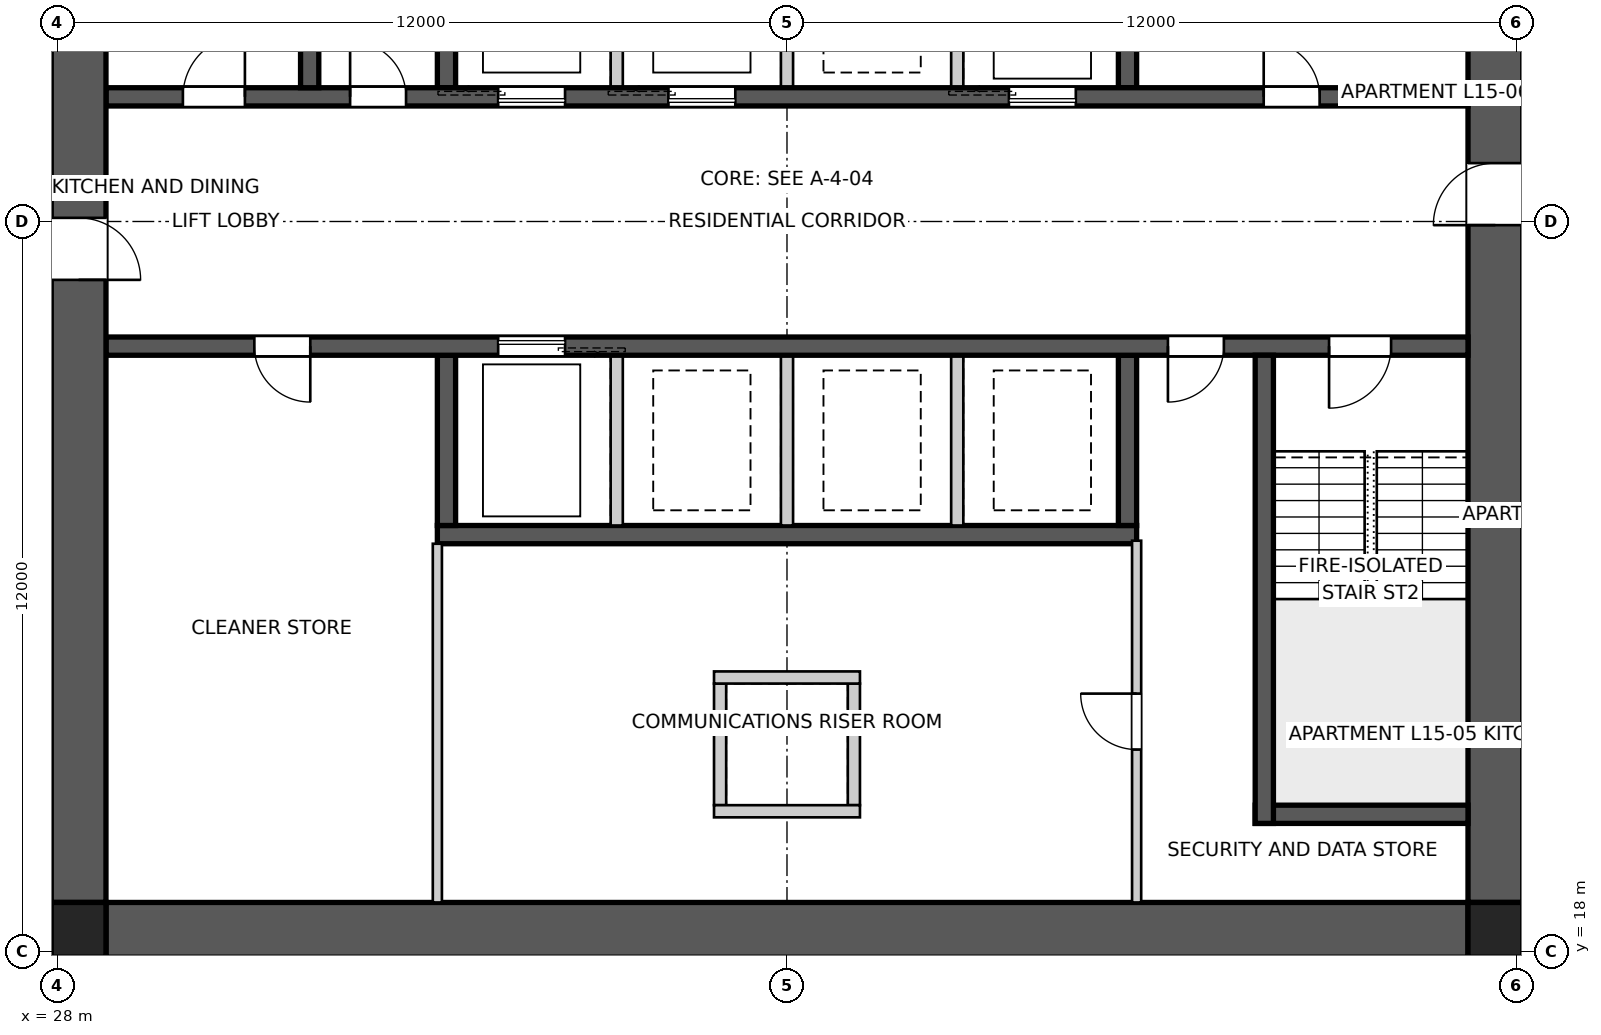
"""IFC4 building model, lengths in metres.
Left out: names, types, materials, properties, quantities, classifications, styles, units other than length and angle.
Written with IfcOpenShell. Run it as: python <this file> out.ifc"""

import sys

from ifc_helpers import new_model, si_unit, direction, frame, frame_2d, origin, origin_2d, place, context, subcontext, project, spatial, polyline, rectangle, outline, extrude, element, fill, save


model = new_model("IFC4")
c1 = context("Model", 3, precision=1e-05, world=origin(), true_north=direction((0.0, 1.0)))
c2 = subcontext(c1, "Body", "Model", "MODEL_VIEW")
j1 = project(units=[si_unit("LENGTHUNIT", "METRE"), si_unit("PLANEANGLEUNIT", "RADIAN")], contexts=[c1])
p1 = place(None, origin())
s1 = spatial("IfcSite", under=j1, at=p1, CompositionType="ELEMENT")
p2 = place(p1, origin())
s2 = spatial("IfcBuilding", under=s1, at=p2, CompositionType="ELEMENT")
p3 = place(p2, frame((0.0, 0.0, 57.4)))
s3 = spatial("IfcBuildingStorey", under=s2, at=p3, CompositionType="ELEMENT", Elevation=57.4)
p4 = place(p3, frame((51.2, 18.35, 0.0), z_axis=(0.0, 0.0, 1.0), x_axis=(-1.0, 0.0, 0.0)))
e1 = element("IfcWall", 1, at=p4, inside=s3, PredefinedType="SHEAR", context=c2, shape_type="SweptSolid", body=[
    extrude(outline(polyline([(0.0, -0.45), (22.4, -0.45), (22.4, -0.025), (22.85, -0.025), (22.85, 0.025), (22.4, 0.025), (22.4, 0.45), (0.0, 0.45), (0.0, 0.025), (-0.45, 0.025), (-0.45, -0.025), (0.0, -0.025), (0.0, -0.45)])), origin(), (0.0, 0.0, 1.0), 3.4),
])
p5 = place(p3, frame((51.65, 18.8, 0.0), z_axis=(0.0, 0.0, 1.0), x_axis=(0.0, 1.0, 0.0)))
e2 = element("IfcWall", 2, at=p5, inside=s3, PredefinedType="SHEAR", context=c2, shape_type="SweptSolid", body=[
    extrude(outline(polyline([(0.0, -0.45), (22.4, -0.45), (22.4, -0.025), (22.85, -0.025), (22.85, 0.025), (22.4, 0.025), (22.4, 0.45), (0.0, 0.45), (0.0, 0.025), (-0.45, 0.025), (-0.45, -0.025), (0.0, -0.025), (0.0, -0.45)])), origin(), (0.0, 0.0, 1.0), 3.4),
])
p6 = place(p5, frame((11.14, 0.0, 0.0)))
e3 = element("IfcOpeningElement", 3, at=p6, cuts=e2, PredefinedType="OPENING", context=c2, shape_type="SweptSolid", body=[
    extrude(rectangle(XDim=1.02, YDim=2.4, at=frame_2d((0.51, 1.2))), frame((0.0, 0.46, 0.0), z_axis=(0.0, -1.0, 0.0), x_axis=(1.0, 0.0, 0.0)), (0.0, 0.0, 1.0), 0.92),
])
p7 = place(p3, frame((28.35, 41.2, 0.0), z_axis=(0.0, 0.0, 1.0), x_axis=(0.0, -1.0, 0.0)))
e4 = element("IfcWall", 4, at=p7, inside=s3, PredefinedType="SHEAR", context=c2, shape_type="SweptSolid", body=[
    extrude(outline(polyline([(0.0, -0.45), (22.4, -0.45), (22.4, -0.025), (22.85, -0.025), (22.85, 0.025), (22.4, 0.025), (22.4, 0.45), (0.0, 0.45), (0.0, 0.025), (-0.45, 0.025), (-0.45, -0.025), (0.0, -0.025), (0.0, -0.45)])), origin(), (0.0, 0.0, 1.0), 3.4),
])
p8 = place(p7, frame((11.14, 0.0, 0.0)))
e5 = element("IfcOpeningElement", 5, at=p8, cuts=e4, PredefinedType="OPENING", context=c2, shape_type="SweptSolid", body=[
    extrude(rectangle(XDim=1.02, YDim=2.4, at=frame_2d((0.51, 1.2))), frame((0.0, 0.46, 0.0), z_axis=(0.0, -1.0, 0.0), x_axis=(1.0, 0.0, 0.0)), (0.0, 0.0, 1.0), 0.92),
])
p9 = place(p3, frame((28.8, 32.05, 0.0), z_axis=(0.0, 0.0, 1.0), x_axis=(1.0, 0.0, 0.0)))
e6 = element("IfcWall", 6, at=p9, inside=s3, PredefinedType="SHEAR", context=c2, shape_type="SweptSolid", body=[
    extrude(rectangle(XDim=22.4, YDim=0.3, at=frame_2d((11.2, 0.0))), origin(), (0.0, 0.0, 1.0), 3.4),
])
p10 = place(p9, frame((19.04, 0.0, 0.0)))
e7 = element("IfcOpeningElement", 7, at=p10, cuts=e6, PredefinedType="OPENING", context=c2, shape_type="SweptSolid", body=[
    extrude(rectangle(XDim=0.92, YDim=2.1, at=frame_2d((0.46, 1.05))), frame((0.0, 0.16, 0.0), z_axis=(0.0, -1.0, 0.0), x_axis=(1.0, 0.0, 0.0)), (0.0, 0.0, 1.0), 0.32),
])
p11 = place(p9, frame((1.265, 0.0, 0.0)))
e8 = element("IfcOpeningElement", 8, at=p11, cuts=e6, PredefinedType="OPENING", context=c2, shape_type="SweptSolid", body=[
    extrude(rectangle(XDim=1.02, YDim=2.1, at=frame_2d((0.51, 1.05))), frame((0.0, 0.16, 0.0), z_axis=(0.0, -1.0, 0.0), x_axis=(1.0, 0.0, 0.0)), (0.0, 0.0, 1.0), 0.32),
])
p12 = place(p9, frame((4.015, 0.0, 0.0)))
e9 = element("IfcOpeningElement", 9, at=p12, cuts=e6, PredefinedType="OPENING", context=c2, shape_type="SweptSolid", body=[
    extrude(rectangle(XDim=0.92, YDim=2.1, at=frame_2d((0.46, 1.05))), frame((0.0, 0.16, 0.0), z_axis=(0.0, -1.0, 0.0), x_axis=(1.0, 0.0, 0.0)), (0.0, 0.0, 1.0), 0.32),
])
p13 = place(p9, frame((6.45, 0.0, 0.0)))
e10 = element("IfcOpeningElement", 10, at=p13, cuts=e6, PredefinedType="OPENING", context=c2, shape_type="SweptSolid", body=[
    extrude(rectangle(XDim=1.1, YDim=2.1, at=frame_2d((0.55, 1.05))), frame((0.0, 0.16, 0.0), z_axis=(0.0, -1.0, 0.0), x_axis=(1.0, 0.0, 0.0)), (0.0, 0.0, 1.0), 0.32),
])
p14 = place(p9, frame((9.25, 0.0, 0.0)))
e11 = element("IfcOpeningElement", 11, at=p14, cuts=e6, PredefinedType="OPENING", context=c2, shape_type="SweptSolid", body=[
    extrude(rectangle(XDim=1.1, YDim=2.1, at=frame_2d((0.55, 1.05))), frame((0.0, 0.16, 0.0), z_axis=(0.0, -1.0, 0.0), x_axis=(1.0, 0.0, 0.0)), (0.0, 0.0, 1.0), 0.32),
])
p15 = place(p9, frame((14.85, 0.0, 0.0)))
e12 = element("IfcOpeningElement", 12, at=p15, cuts=e6, PredefinedType="OPENING", context=c2, shape_type="SweptSolid", body=[
    extrude(rectangle(XDim=1.1, YDim=2.1, at=frame_2d((0.55, 1.05))), frame((0.0, 0.16, 0.0), z_axis=(0.0, -1.0, 0.0), x_axis=(1.0, 0.0, 0.0)), (0.0, 0.0, 1.0), 0.32),
])
p16 = place(p3, frame((51.2, 27.95, 0.0), z_axis=(0.0, 0.0, 1.0), x_axis=(-1.0, 0.0, 0.0)))
e13 = element("IfcWall", 13, at=p16, inside=s3, PredefinedType="SHEAR", context=c2, shape_type="SweptSolid", body=[
    extrude(rectangle(XDim=22.4, YDim=0.3, at=frame_2d((11.2, 0.0))), origin(), (0.0, 0.0, 1.0), 3.4),
])
p17 = place(p16, frame((19.04, 0.0, 0.0)))
e14 = element("IfcOpeningElement", 14, at=p17, cuts=e13, PredefinedType="OPENING", context=c2, shape_type="SweptSolid", body=[
    extrude(rectangle(XDim=0.92, YDim=2.1, at=frame_2d((0.46, 1.05))), frame((0.0, 0.16, 0.0), z_axis=(0.0, -1.0, 0.0), x_axis=(1.0, 0.0, 0.0)), (0.0, 0.0, 1.0), 0.32),
])
p18 = place(p16, frame((1.265, 0.0, 0.0)))
e15 = element("IfcOpeningElement", 15, at=p18, cuts=e13, PredefinedType="OPENING", context=c2, shape_type="SweptSolid", body=[
    extrude(rectangle(XDim=1.02, YDim=2.1, at=frame_2d((0.51, 1.05))), frame((0.0, 0.16, 0.0), z_axis=(0.0, -1.0, 0.0), x_axis=(1.0, 0.0, 0.0)), (0.0, 0.0, 1.0), 0.32),
])
p19 = place(p16, frame((4.015, 0.0, 0.0)))
e16 = element("IfcOpeningElement", 16, at=p19, cuts=e13, PredefinedType="OPENING", context=c2, shape_type="SweptSolid", body=[
    extrude(rectangle(XDim=0.92, YDim=2.1, at=frame_2d((0.46, 1.05))), frame((0.0, 0.16, 0.0), z_axis=(0.0, -1.0, 0.0), x_axis=(1.0, 0.0, 0.0)), (0.0, 0.0, 1.0), 0.32),
])
p20 = place(p16, frame((14.85, 0.0, 0.0)))
e17 = element("IfcOpeningElement", 17, at=p20, cuts=e13, PredefinedType="OPENING", context=c2, shape_type="SweptSolid", body=[
    extrude(rectangle(XDim=1.1, YDim=2.1, at=frame_2d((0.55, 1.05))), frame((0.0, 0.16, 0.0), z_axis=(0.0, -1.0, 0.0), x_axis=(1.0, 0.0, 0.0)), (0.0, 0.0, 1.0), 0.32),
])
p21 = place(p3, frame((45.75, 24.85, 0.0), z_axis=(0.0, 0.0, 1.0), x_axis=(-1.0, 0.0, 0.0)))
e18 = element("IfcWall", 18, at=p21, inside=s3, PredefinedType="SHEAR", context=c2, shape_type="SweptSolid", body=[
    extrude(rectangle(XDim=11.5, YDim=0.3, at=frame_2d((5.75, 0.0))), origin(), (0.0, 0.0, 1.0), 3.4),
])
for number, where, z_axis, x_axis in (
    (19, (34.4, 32.2, 0.0), (0.0, 0.0, 1.0), (0.0, 1.0, 0.0)),
    (20, (45.6, 27.8, 0.0), (0.0, 0.0, 1.0), (0.0, -1.0, 0.0)),
):
    element("IfcWall", number, at=place(p3, frame(where, z_axis=z_axis, x_axis=x_axis)), inside=s3, PredefinedType="SHEAR", context=c2, shape_type="SweptSolid", body=[
        extrude(rectangle(XDim=2.8, YDim=0.3, at=frame_2d((1.4, 0.0))), origin(), (0.0, 0.0, 1.0), 3.4),
    ])
for number, where, z_axis, x_axis in (
    (21, (37.2, 32.2, 0.0), (0.0, 0.0, 1.0), (0.0, 1.0, 0.0)),
    (22, (42.8, 27.8, 0.0), (0.0, 0.0, 1.0), (0.0, -1.0, 0.0)),
    (23, (40.0, 32.2, 0.0), (0.0, 0.0, 1.0), (0.0, 1.0, 0.0)),
    (24, (40.0, 27.8, 0.0), (0.0, 0.0, 1.0), (0.0, -1.0, 0.0)),
    (25, (42.8, 32.2, 0.0), (0.0, 0.0, 1.0), (0.0, 1.0, 0.0)),
    (26, (37.2, 27.8, 0.0), (0.0, 0.0, 1.0), (0.0, -1.0, 0.0)),
):
    element("IfcWall", number, at=place(p3, frame(where, z_axis=z_axis, x_axis=x_axis)), inside=s3, PredefinedType="SOLIDWALL", context=c2, shape_type="SweptSolid", body=[
        extrude(rectangle(XDim=2.8, YDim=0.2, at=frame_2d((1.4, 0.0))), origin(), (0.0, 0.0, 1.0), 3.4),
    ])
for number, where, z_axis, x_axis in (
    (27, (45.6, 32.2, 0.0), (0.0, 0.0, 1.0), (0.0, 1.0, 0.0)),
    (28, (34.4, 27.8, 0.0), (0.0, 0.0, 1.0), (0.0, -1.0, 0.0)),
):
    element("IfcWall", number, at=place(p3, frame(where, z_axis=z_axis, x_axis=x_axis)), inside=s3, PredefinedType="SHEAR", context=c2, shape_type="SweptSolid", body=[
        extrude(rectangle(XDim=2.8, YDim=0.3, at=frame_2d((1.4, 0.0))), origin(), (0.0, 0.0, 1.0), 3.4),
    ])
for number, where, z_axis, x_axis in (
    (29, (32.15, 32.2, 0.0), (0.0, 0.0, 1.0), (0.0, 1.0, 0.0)),
    (30, (47.85, 27.8, 0.0), (0.0, 0.0, 1.0), (0.0, -1.0, 0.0)),
):
    element("IfcWall", number, at=place(p3, frame(where, z_axis=z_axis, x_axis=x_axis)), inside=s3, PredefinedType="SHEAR", context=c2, shape_type="SweptSolid", body=[
        extrude(rectangle(XDim=7.7, YDim=0.3, at=frame_2d((3.85, 0.0))), origin(), (0.0, 0.0, 1.0), 3.4),
    ])
p22 = place(p3, frame((51.2, 20.25, 0.0), z_axis=(0.0, 0.0, 1.0), x_axis=(-1.0, 0.0, 0.0)))
e31 = element("IfcWall", 31, at=p22, inside=s3, PredefinedType="SHEAR", context=c2, shape_type="SweptSolid", body=[
    extrude(rectangle(XDim=3.5, YDim=0.3, at=frame_2d((1.75, 0.0))), origin(), (0.0, 0.0, 1.0), 3.4),
])
for number, where, z_axis, x_axis in (
    (32, (38.9, 22.4, 0.0), (0.0, 0.0, 1.0), (0.0, -1.0, 0.0)),
    (33, (41.1, 22.4, 0.0), (0.0, 0.0, 1.0), (0.0, -1.0, 0.0)),
):
    element("IfcWall", number, at=place(p3, frame(where, z_axis=z_axis, x_axis=x_axis)), inside=s3, PredefinedType="SOLIDWALL", context=c2, shape_type="SweptSolid", body=[
        extrude(rectangle(XDim=2.0, YDim=0.2, at=frame_2d((1.0, 0.0))), origin(), (0.0, 0.0, 1.0), 3.4),
    ])
for number, where, z_axis, x_axis in (
    (34, (38.8, 22.5, 0.0), (0.0, 0.0, 1.0), (1.0, 0.0, 0.0)),
    (35, (38.8, 20.3, 0.0), (0.0, 0.0, 1.0), (1.0, 0.0, 0.0)),
):
    element("IfcWall", number, at=place(p3, frame(where, z_axis=z_axis, x_axis=x_axis)), inside=s3, PredefinedType="SOLIDWALL", context=c2, shape_type="SweptSolid", body=[
        extrude(rectangle(XDim=2.4, YDim=0.2, at=frame_2d((1.2, 0.0))), origin(), (0.0, 0.0, 1.0), 3.4),
    ])
for number, where, z_axis, x_axis in (
    (36, (28.35, 18.35, 0.0), (0.0, 0.0, 1.0), (1.0, 0.0, 0.0)),
    (37, (51.65, 18.35, 0.0), (0.0, 0.0, 1.0), (1.0, 0.0, 0.0)),
):
    element("IfcColumn", number, at=place(p3, frame(where, z_axis=z_axis, x_axis=x_axis)), inside=s3, PredefinedType="COLUMN", context=c2, shape_type="SweptSolid", body=[
        extrude(rectangle(XDim=0.9, YDim=0.9, at=origin_2d()), origin(), (0.0, 0.0, 1.0), 3.4),
    ])
p23 = place(p3, frame((45.75, 18.8, 0.0), z_axis=(0.0, 0.0, 1.0), x_axis=(0.0, 1.0, 0.0)))
e38 = element("IfcWall", 38, at=p23, inside=s3, PredefinedType="SOLIDWALL", context=c2, shape_type="SweptSolid", body=[
    extrude(rectangle(XDim=5.95, YDim=0.15, at=frame_2d((2.975, 0.0))), origin(), (0.0, 0.0, 1.0), 3.25),
])
p24 = place(p23, frame((2.515, 0.0, 0.0)))
e39 = element("IfcOpeningElement", 39, at=p24, cuts=e38, PredefinedType="OPENING", context=c2, shape_type="SweptSolid", body=[
    extrude(rectangle(XDim=0.92, YDim=2.1, at=frame_2d((0.46, 1.05))), frame((0.0, 0.085, 0.0), z_axis=(0.0, -1.0, 0.0), x_axis=(1.0, 0.0, 0.0)), (0.0, 0.0, 1.0), 0.17),
])
p25 = place(p3, frame((34.25, 18.8, 0.0), z_axis=(0.0, 0.0, 1.0), x_axis=(0.0, 1.0, 0.0)))
e40 = element("IfcWall", 40, at=p25, inside=s3, PredefinedType="SOLIDWALL", context=c2, shape_type="SweptSolid", body=[
    extrude(rectangle(XDim=5.9, YDim=0.15, at=frame_2d((2.95, 0.0))), origin(), (0.0, 0.0, 1.0), 3.25),
])
p26 = place(p10, origin())
e41 = element("IfcDoor", 41, at=p26, inside=s3, OperationType="SINGLE_SWING_LEFT", PredefinedType="DOOR", context=c2, shape_type="SweptSolid", body=[
    extrude(rectangle(XDim=0.92, YDim=2.1, at=frame_2d((0.46, 1.05))), frame((0.0, 0.025, 0.0), z_axis=(0.0, -1.0, 0.0), x_axis=(1.0, 0.0, 0.0)), (0.0, 0.0, 1.0), 0.05),
])
fill(e7, e41)
p27 = place(p17, origin())
e42 = element("IfcDoor", 42, at=p27, inside=s3, OperationType="SINGLE_SWING_LEFT", PredefinedType="DOOR", context=c2, shape_type="SweptSolid", body=[
    extrude(rectangle(XDim=0.92, YDim=2.1, at=frame_2d((0.46, 1.05))), frame((0.0, 0.025, 0.0), z_axis=(0.0, -1.0, 0.0), x_axis=(1.0, 0.0, 0.0)), (0.0, 0.0, 1.0), 0.05),
])
fill(e14, e42)
p28 = place(p18, origin())
e43 = element("IfcDoor", 43, at=p28, inside=s3, OperationType="SINGLE_SWING_RIGHT", PredefinedType="DOOR", context=c2, shape_type="SweptSolid", body=[
    extrude(rectangle(XDim=1.02, YDim=2.1, at=frame_2d((0.51, 1.05))), frame((0.0, 0.025, 0.0), z_axis=(0.0, -1.0, 0.0), x_axis=(1.0, 0.0, 0.0)), (0.0, 0.0, 1.0), 0.05),
])
fill(e15, e43)
p29 = place(p11, origin())
e44 = element("IfcDoor", 44, at=p29, inside=s3, OperationType="SINGLE_SWING_RIGHT", PredefinedType="DOOR", context=c2, shape_type="SweptSolid", body=[
    extrude(rectangle(XDim=1.02, YDim=2.1, at=frame_2d((0.51, 1.05))), frame((0.0, 0.025, 0.0), z_axis=(0.0, -1.0, 0.0), x_axis=(1.0, 0.0, 0.0)), (0.0, 0.0, 1.0), 0.05),
])
fill(e8, e44)
p30 = place(p12, origin())
e45 = element("IfcDoor", 45, at=p30, inside=s3, OperationType="SINGLE_SWING_LEFT", PredefinedType="DOOR", context=c2, shape_type="SweptSolid", body=[
    extrude(rectangle(XDim=0.92, YDim=2.1, at=frame_2d((0.46, 1.05))), frame((0.0, 0.025, 0.0), z_axis=(0.0, -1.0, 0.0), x_axis=(1.0, 0.0, 0.0)), (0.0, 0.0, 1.0), 0.05),
])
fill(e9, e45)
p31 = place(p19, origin())
e46 = element("IfcDoor", 46, at=p31, inside=s3, OperationType="SINGLE_SWING_RIGHT", PredefinedType="DOOR", context=c2, shape_type="SweptSolid", body=[
    extrude(rectangle(XDim=0.92, YDim=2.1, at=frame_2d((0.46, 1.05))), frame((0.0, 0.025, 0.0), z_axis=(0.0, -1.0, 0.0), x_axis=(1.0, 0.0, 0.0)), (0.0, 0.0, 1.0), 0.05),
])
fill(e16, e46)
p32 = place(p24, origin())
e47 = element("IfcDoor", 47, at=p32, inside=s3, OperationType="SINGLE_SWING_RIGHT", PredefinedType="DOOR", context=c2, shape_type="SweptSolid", body=[
    extrude(rectangle(XDim=0.92, YDim=2.1, at=frame_2d((0.46, 1.05))), frame((0.0, 0.025, 0.0), z_axis=(0.0, -1.0, 0.0), x_axis=(1.0, 0.0, 0.0)), (0.0, 0.0, 1.0), 0.05),
])
fill(e39, e47)
p33 = place(p6, origin())
e48 = element("IfcDoor", 48, at=p33, inside=s3, OperationType="SINGLE_SWING_LEFT", PredefinedType="DOOR", context=c2, shape_type="SweptSolid", body=[
    extrude(rectangle(XDim=1.02, YDim=2.4, at=frame_2d((0.51, 1.2))), frame((0.0, 0.025, 0.0), z_axis=(0.0, -1.0, 0.0), x_axis=(1.0, 0.0, 0.0)), (0.0, 0.0, 1.0), 0.05),
])
fill(e3, e48)
p34 = place(p8, origin())
e49 = element("IfcDoor", 49, at=p34, inside=s3, OperationType="SINGLE_SWING_RIGHT", PredefinedType="DOOR", context=c2, shape_type="SweptSolid", body=[
    extrude(rectangle(XDim=1.02, YDim=2.4, at=frame_2d((0.51, 1.2))), frame((0.0, 0.025, 0.0), z_axis=(0.0, -1.0, 0.0), x_axis=(1.0, 0.0, 0.0)), (0.0, 0.0, 1.0), 0.05),
])
fill(e5, e49)
p35 = place(p13, origin())
e50 = element("IfcDoor", 50, at=p35, inside=s3, OperationType="SLIDING_TO_LEFT", PredefinedType="DOOR", context=c2, shape_type="SweptSolid", body=[
    extrude(rectangle(XDim=1.1, YDim=2.1, at=frame_2d((0.55, 1.05))), frame((0.0, 0.025, 0.0), z_axis=(0.0, -1.0, 0.0), x_axis=(1.0, 0.0, 0.0)), (0.0, 0.0, 1.0), 0.05),
])
fill(e10, e50)
p36 = place(p14, origin())
e51 = element("IfcDoor", 51, at=p36, inside=s3, OperationType="SLIDING_TO_LEFT", PredefinedType="DOOR", context=c2, shape_type="SweptSolid", body=[
    extrude(rectangle(XDim=1.1, YDim=2.1, at=frame_2d((0.55, 1.05))), frame((0.0, 0.025, 0.0), z_axis=(0.0, -1.0, 0.0), x_axis=(1.0, 0.0, 0.0)), (0.0, 0.0, 1.0), 0.05),
])
fill(e11, e51)
p37 = place(p15, origin())
e52 = element("IfcDoor", 52, at=p37, inside=s3, OperationType="SLIDING_TO_LEFT", PredefinedType="DOOR", context=c2, shape_type="SweptSolid", body=[
    extrude(rectangle(XDim=1.1, YDim=2.1, at=frame_2d((0.55, 1.05))), frame((0.0, 0.025, 0.0), z_axis=(0.0, -1.0, 0.0), x_axis=(1.0, 0.0, 0.0)), (0.0, 0.0, 1.0), 0.05),
])
fill(e12, e52)
p38 = place(p20, origin())
e53 = element("IfcDoor", 53, at=p38, inside=s3, OperationType="SLIDING_TO_LEFT", PredefinedType="DOOR", context=c2, shape_type="SweptSolid", body=[
    extrude(rectangle(XDim=1.1, YDim=2.1, at=frame_2d((0.55, 1.05))), frame((0.0, 0.025, 0.0), z_axis=(0.0, -1.0, 0.0), x_axis=(1.0, 0.0, 0.0)), (0.0, 0.0, 1.0), 0.05),
])
fill(e17, e53)
save(model, sys.argv[1])
